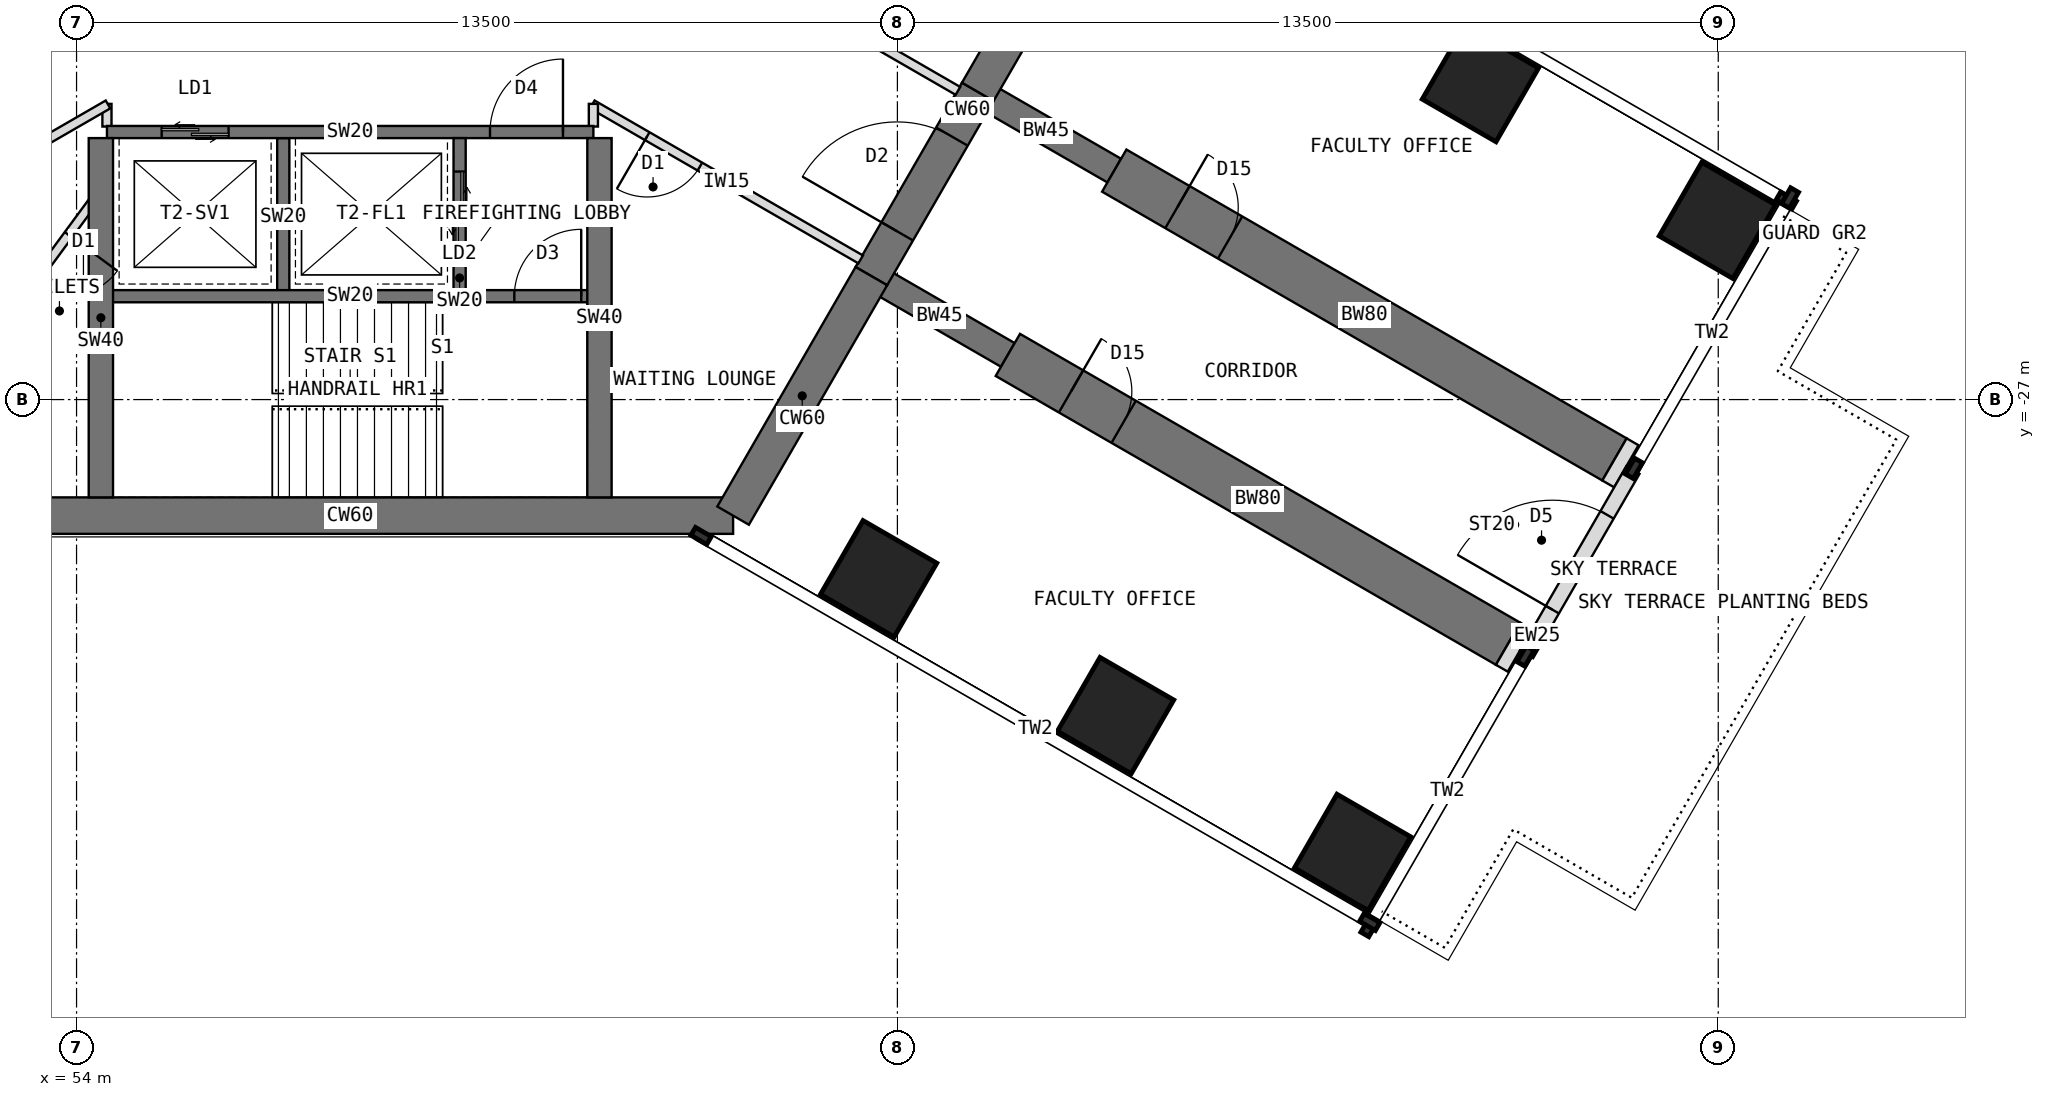
"""IFC4 building model, lengths in metres.
Left out: names, types, materials, properties, quantities, classifications, styles, units other than length and angle.
Written with IfcOpenShell. Run it as: python <this file> out.ifc"""

import sys

from ifc_helpers import new_model, si_unit, direction, frame, frame_2d, origin, origin_2d, place, context, subcontext, project, spatial, rectangle, extrude, element, fill, save


model = new_model("IFC4")
c1 = context("Model", 3, precision=1e-05, world=origin(), true_north=direction((0.0, 1.0)))
c2 = subcontext(c1, "Body", "Model", "MODEL_VIEW")
j1 = project(units=[si_unit("LENGTHUNIT", "METRE"), si_unit("PLANEANGLEUNIT", "RADIAN")], contexts=[c1])
p1 = place(None, origin())
s1 = spatial("IfcSite", under=j1, at=p1, CompositionType="ELEMENT")
p2 = place(p1, origin())
s2 = spatial("IfcBuilding", under=s1, at=p2, CompositionType="ELEMENT")
p3 = place(p2, frame((0.0, 0.0, 97.5)))
s3 = spatial("IfcBuildingStorey", under=s2, at=p3, CompositionType="ELEMENT", Elevation=97.5)
p4 = place(p3, frame((52.202, -28.908, 0.0), z_axis=(0.0, 0.0, 1.0), x_axis=(1.0, 0.0, 0.0)))
e1 = element("IfcWall", 1, at=p4, inside=s3, PredefinedType="SHEAR", context=c2, shape_type="SweptSolid", body=[
    extrude(rectangle(XDim=12.596, YDim=0.6, at=frame_2d((6.298, 0.0))), origin(), (0.0, 0.0, 1.0), 4.0),
])
p5 = place(p3, frame((64.798, -28.908, 0.0), z_axis=(0.0, 0.0, 1.0), x_axis=(0.499984222037, 0.866034513004, 0.0)))
e2 = element("IfcWall", 2, at=p5, inside=s3, PredefinedType="SHEAR", context=c2, shape_type="SweptSolid", body=[
    extrude(rectangle(XDim=4.548, YDim=0.6, at=frame_2d((2.274, 0.0))), origin(), (0.0, 0.0, 1.0), 4.0),
])
p6 = place(p3, frame((67.072, -24.97, 0.0), z_axis=(0.0, 0.0, 1.0), x_axis=(0.500010275428, 0.866019471182, 0.0)))
e3 = element("IfcWall", 3, at=p6, inside=s3, PredefinedType="SHEAR", context=c2, shape_type="SweptSolid", body=[
    extrude(rectangle(XDim=3.5, YDim=0.6, at=frame_2d((1.75, 0.0))), origin(), (0.0, 0.0, 1.0), 4.0),
])
p7 = place(p6, frame((0.85, 0.0, 0.0)))
e4 = element("IfcOpeningElement", 4, at=p7, cuts=e3, PredefinedType="OPENING", context=c2, shape_type="SweptSolid", body=[
    extrude(rectangle(XDim=1.8, YDim=2.1, at=frame_2d((0.9, 1.05))), frame((0.0, 0.31, 0.0), z_axis=(0.0, -1.0, 0.0), x_axis=(1.0, 0.0, 0.0)), (0.0, 0.0, 1.0), 0.62),
])
p8 = place(p3, frame((68.822, -21.939, 0.0), z_axis=(0.0, 0.0, 1.0), x_axis=(0.500024481964, 0.866011268655, 0.0)))
e5 = element("IfcWall", 5, at=p8, inside=s3, PredefinedType="SHEAR", context=c2, shape_type="SweptSolid", body=[
    extrude(rectangle(XDim=4.548, YDim=0.6, at=frame_2d((2.274, 0.0))), origin(), (0.0, 0.0, 1.0), 4.0),
])
p9 = place(p3, frame((68.822, -21.939, 0.0), z_axis=(0.0, 0.0, 1.0), x_axis=(0.866072649678, -0.499918158782, 0.0)))
e6 = element("IfcWall", 6, at=p9, inside=s3, PredefinedType="SHEAR", context=c2, shape_type="SweptSolid", body=[
    extrude(rectangle(XDim=2.592, YDim=0.45, at=frame_2d((1.296, 0.0))), origin(), (0.0, 0.0, 1.0), 4.0),
])
p10 = place(p3, frame((71.066, -23.234, 0.0), z_axis=(0.0, 0.0, 1.0), x_axis=(0.86602681393, -0.499997557548, 0.0)))
e7 = element("IfcWall", 7, at=p10, inside=s3, PredefinedType="SHEAR", context=c2, shape_type="SweptSolid", body=[
    extrude(rectangle(XDim=9.5, YDim=0.8, at=frame_2d((4.75, 0.0))), origin(), (0.0, 0.0, 1.0), 4.0),
])
p11 = place(p10, frame((1.2, 0.0, 0.0)))
e8 = element("IfcOpeningElement", 8, at=p11, cuts=e7, PredefinedType="OPENING", context=c2, shape_type="SweptSolid", body=[
    extrude(rectangle(XDim=1.0, YDim=2.1, at=frame_2d((0.5, 1.05))), frame((0.0, 0.41, 0.0), z_axis=(0.0, -1.0, 0.0), x_axis=(1.0, 0.0, 0.0)), (0.0, 0.0, 1.0), 0.82),
])
p12 = place(p3, frame((67.072, -24.97, 0.0), z_axis=(0.0, 0.0, 1.0), x_axis=(0.866031863473, -0.499988811324, 0.0)))
e9 = element("IfcWall", 9, at=p12, inside=s3, PredefinedType="SHEAR", context=c2, shape_type="SweptSolid", body=[
    extrude(rectangle(XDim=2.592, YDim=0.45, at=frame_2d((1.296, 0.0))), origin(), (0.0, 0.0, 1.0), 4.0),
])
p13 = place(p3, frame((69.316, -26.266, 0.0), z_axis=(0.0, 0.0, 1.0), x_axis=(0.86602681393, -0.499997557548, 0.0)))
e10 = element("IfcWall", 10, at=p13, inside=s3, PredefinedType="SHEAR", context=c2, shape_type="SweptSolid", body=[
    extrude(rectangle(XDim=9.5, YDim=0.8, at=frame_2d((4.75, 0.0))), origin(), (0.0, 0.0, 1.0), 4.0),
])
p14 = place(p13, frame((1.2, 0.0, 0.0)))
e11 = element("IfcOpeningElement", 11, at=p14, cuts=e10, PredefinedType="OPENING", context=c2, shape_type="SweptSolid", body=[
    extrude(rectangle(XDim=1.0, YDim=2.1, at=frame_2d((0.5, 1.05))), frame((0.0, 0.41, 0.0), z_axis=(0.0, -1.0, 0.0), x_axis=(1.0, 0.0, 0.0)), (0.0, 0.0, 1.0), 0.82),
])
for number, where, z_axis, x_axis in (
    (12, (67.191, -29.946, 0.0), (0.0, 0.0, 1.0), (0.5, 0.866, 0.0)),
    (13, (77.088, -21.804, 0.0), (0.0, 0.0, 1.0), (0.5, 0.866, 0.0)),
    (14, (71.088, -32.196, 0.0), (0.0, 0.0, 1.0), (0.5, 0.866, 0.0)),
    (15, (80.986, -24.054, 0.0), (0.0, 0.0, 1.0), (0.5, 0.866, 0.0)),
    (16, (74.986, -34.446, 0.0), (0.0, 0.0, 1.0), (0.5, 0.866, 0.0)),
):
    element("IfcColumn", number, at=place(p3, frame(where, z_axis=z_axis, x_axis=x_axis)), inside=s3, PredefinedType="COLUMN", context=c2, shape_type="SweptSolid", body=[
        extrude(rectangle(XDim=1.4, YDim=1.4, at=origin_2d()), origin(), (0.0, 0.0, 1.0), 4.0),
    ])
p15 = place(p3, frame((77.847, -31.19, 0.0), z_axis=(0.0, 0.0, 1.0), x_axis=(0.500010275428, 0.866019471182, 0.0)))
e17 = element("IfcWall", 17, at=p15, inside=s3, PredefinedType="STANDARD", context=c2, shape_type="SweptSolid", body=[
    extrude(rectangle(XDim=3.5, YDim=0.25, at=frame_2d((1.75, 0.0))), origin(), (0.0, 0.0, 1.0), 3.8),
])
p16 = place(p15, frame((0.85, 0.0, 0.0)))
e18 = element("IfcOpeningElement", 18, at=p16, cuts=e17, PredefinedType="OPENING", context=c2, shape_type="SweptSolid", body=[
    extrude(rectangle(XDim=1.8, YDim=2.4, at=frame_2d((0.9, 1.2))), frame((0.0, 0.135, 0.0), z_axis=(0.0, -1.0, 0.0), x_axis=(1.0, 0.0, 0.0)), (0.0, 0.0, 1.0), 0.27),
])
p17 = place(p3, frame((79.294, -27.984, 0.0), z_axis=(0.0, 0.0, 1.0), x_axis=(0.865896406789, -0.500223362819, 0.0)))
e19 = element("IfcWall", 19, at=p17, inside=s3, PredefinedType="PARTITIONING", context=c2, shape_type="SweptSolid", body=[
    extrude(rectangle(XDim=0.225, YDim=0.8, at=frame_2d((0.113, 0.0))), origin(), (0.0, 0.0, 1.0), 3.8),
])
p18 = place(p3, frame((77.544, -31.016, 0.0), z_axis=(0.0, 0.0, 1.0), x_axis=(0.866366273901, -0.499409130319, 0.0)))
e20 = element("IfcWall", 20, at=p18, inside=s3, PredefinedType="PARTITIONING", context=c2, shape_type="SweptSolid", body=[
    extrude(rectangle(XDim=0.225, YDim=0.8, at=frame_2d((0.112, 0.0))), origin(), (0.0, 0.0, 1.0), 3.8),
])
p19 = place(p3, frame((54.5, -22.6, 0.0), z_axis=(0.0, 0.0, 1.0), x_axis=(1.0, 0.0, 0.0)))
e21 = element("IfcWall", 21, at=p19, inside=s3, PredefinedType="SHEAR", context=c2, shape_type="SweptSolid", body=[
    extrude(rectangle(XDim=8.0, YDim=0.2, at=frame_2d((4.0, 0.0))), origin(), (0.0, 0.0, 1.0), 4.0),
])
p20 = place(p19, frame((6.3, 0.0, 0.0)))
e22 = element("IfcOpeningElement", 22, at=p20, cuts=e21, PredefinedType="OPENING", context=c2, shape_type="SweptSolid", body=[
    extrude(rectangle(XDim=1.2, YDim=2.1, at=frame_2d((0.6, 1.05))), frame((0.0, 0.11, 0.0), z_axis=(0.0, -1.0, 0.0), x_axis=(1.0, 0.0, 0.0)), (0.0, 0.0, 1.0), 0.22),
])
p21 = place(p19, frame((0.9, 0.0, 0.0)))
e23 = element("IfcOpeningElement", 23, at=p21, cuts=e21, PredefinedType="OPENING", context=c2, shape_type="SweptSolid", body=[
    extrude(rectangle(XDim=1.1, YDim=2.2, at=frame_2d((0.55, 1.1))), frame((0.0, 0.11, 0.0), z_axis=(0.0, -1.0, 0.0), x_axis=(1.0, 0.0, 0.0)), (0.0, 0.0, 1.0), 0.22),
])
p22 = place(p3, frame((57.4, -22.7, 0.0), z_axis=(0.0, 0.0, 1.0), x_axis=(0.0, -1.0, 0.0)))
e24 = element("IfcWall", 24, at=p22, inside=s3, PredefinedType="SHEAR", context=c2, shape_type="SweptSolid", body=[
    extrude(rectangle(XDim=2.6, YDim=0.2, at=frame_2d((1.3, 0.0))), origin(), (0.0, 0.0, 1.0), 4.0),
])
p23 = place(p3, frame((60.3, -22.7, 0.0), z_axis=(0.0, 0.0, 1.0), x_axis=(0.0, -1.0, 0.0)))
e25 = element("IfcWall", 25, at=p23, inside=s3, PredefinedType="SHEAR", context=c2, shape_type="SweptSolid", body=[
    extrude(rectangle(XDim=2.6, YDim=0.2, at=frame_2d((1.3, 0.0))), origin(), (0.0, 0.0, 1.0), 4.0),
])
p24 = place(p23, frame((0.55, 0.0, 0.0)))
e26 = element("IfcOpeningElement", 26, at=p24, cuts=e25, PredefinedType="OPENING", context=c2, shape_type="SweptSolid", body=[
    extrude(rectangle(XDim=1.3, YDim=2.2, at=frame_2d((0.65, 1.1))), frame((0.0, 0.11, 0.0), z_axis=(0.0, -1.0, 0.0), x_axis=(1.0, 0.0, 0.0)), (0.0, 0.0, 1.0), 0.22),
])
p25 = place(p3, frame((54.5, -25.3, 0.0), z_axis=(0.0, 0.0, 1.0), x_axis=(1.0, 0.0, 0.0)))
e27 = element("IfcWall", 27, at=p25, inside=s3, PredefinedType="SHEAR", context=c2, shape_type="SweptSolid", body=[
    extrude(rectangle(XDim=8.0, YDim=0.2, at=frame_2d((4.0, 0.0))), origin(), (0.0, 0.0, 1.0), 4.0),
])
p26 = place(p25, frame((6.7, 0.0, 0.0)))
e28 = element("IfcOpeningElement", 28, at=p26, cuts=e27, PredefinedType="OPENING", context=c2, shape_type="SweptSolid", body=[
    extrude(rectangle(XDim=1.1, YDim=2.1, at=frame_2d((0.55, 1.05))), frame((0.0, 0.11, 0.0), z_axis=(0.0, -1.0, 0.0), x_axis=(1.0, 0.0, 0.0)), (0.0, 0.0, 1.0), 0.22),
])
for number, where, z_axis, x_axis in (
    (29, (62.6, -22.7, 0.0), (0.0, 0.0, 1.0), (0.0, -1.0, 0.0)),
    (30, (54.4, -22.7, 0.0), (0.0, 0.0, 1.0), (0.0, -1.0, 0.0)),
):
    element("IfcWall", number, at=place(p3, frame(where, z_axis=z_axis, x_axis=x_axis)), inside=s3, PredefinedType="SHEAR", context=c2, shape_type="SweptSolid", body=[
        extrude(rectangle(XDim=5.908, YDim=0.4, at=frame_2d((2.954, 0.0))), origin(), (0.0, 0.0, 1.0), 4.0),
    ])
p27 = place(p3, frame((54.5, -22.51, 0.0), z_axis=(0.0, 0.0, 1.0), x_axis=(0.0, 1.0, 0.0)))
e31 = element("IfcWall", 31, at=p27, inside=s3, PredefinedType="PARTITIONING", context=c2, shape_type="SweptSolid", body=[
    extrude(rectangle(XDim=0.373, YDim=0.15, at=frame_2d((0.187, 0.0))), origin(), (0.0, 0.0, 1.0), 3.8),
])
p28 = place(p3, frame((54.517, -22.147, 0.0), z_axis=(0.0, 0.0, 1.0), x_axis=(-0.866029209911, -0.499993407537, 0.0)))
e32 = element("IfcWall", 32, at=p28, inside=s3, PredefinedType="PARTITIONING", context=c2, shape_type="SweptSolid", body=[
    extrude(rectangle(XDim=5.096, YDim=0.15, at=frame_2d((2.548, 0.0))), origin(), (0.0, 0.0, 1.0), 3.8),
])
p29 = place(p28, frame((3.073, 0.0, 0.0)))
e33 = element("IfcOpeningElement", 33, at=p29, cuts=e32, PredefinedType="OPENING", context=c2, shape_type="SweptSolid", body=[
    extrude(rectangle(XDim=1.0, YDim=2.1, at=frame_2d((0.5, 1.05))), frame((0.0, 0.085, 0.0), z_axis=(0.0, -1.0, 0.0), x_axis=(1.0, 0.0, 0.0)), (0.0, 0.0, 1.0), 0.17),
])
p30 = place(p3, frame((64.083, -19.375, 0.0), z_axis=(0.0, 0.0, 1.0), x_axis=(0.865996484538, -0.500050086259, 0.0)))
e34 = element("IfcWall", 34, at=p30, inside=s3, PredefinedType="PARTITIONING", context=c2, shape_type="SweptSolid", body=[
    extrude(rectangle(XDim=5.096, YDim=0.15, at=frame_2d((2.548, 0.0))), origin(), (0.0, 0.0, 1.0), 3.8),
])
p31 = place(p30, frame((1.043, 0.0, 0.0)))
e35 = element("IfcOpeningElement", 35, at=p31, cuts=e34, PredefinedType="OPENING", context=c2, shape_type="SweptSolid", body=[
    extrude(rectangle(XDim=1.0, YDim=2.1, at=frame_2d((0.5, 1.05))), frame((0.0, 0.085, 0.0), z_axis=(0.0, -1.0, 0.0), x_axis=(1.0, 0.0, 0.0)), (0.0, 0.0, 1.0), 0.17),
])
p32 = place(p3, frame((66.896, -24.695, 0.0), z_axis=(0.0, 0.0, 1.0), x_axis=(-0.866029209911, 0.499993407537, 0.0)))
e36 = element("IfcWall", 36, at=p32, inside=s3, PredefinedType="PARTITIONING", context=c2, shape_type="SweptSolid", body=[
    extrude(rectangle(XDim=5.096, YDim=0.15, at=frame_2d((2.548, 0.0))), origin(), (0.0, 0.0, 1.0), 3.8),
])
p33 = place(p32, frame((3.053, 0.0, 0.0)))
e37 = element("IfcOpeningElement", 37, at=p33, cuts=e36, PredefinedType="OPENING", context=c2, shape_type="SweptSolid", body=[
    extrude(rectangle(XDim=1.0, YDim=2.1, at=frame_2d((0.5, 1.05))), frame((0.0, 0.085, 0.0), z_axis=(0.0, -1.0, 0.0), x_axis=(1.0, 0.0, 0.0)), (0.0, 0.0, 1.0), 0.17),
])
p34 = place(p3, frame((62.5, -22.137, 0.0), z_axis=(0.0, 0.0, 1.0), x_axis=(0.0, -1.0, 0.0)))
e38 = element("IfcWall", 38, at=p34, inside=s3, PredefinedType="PARTITIONING", context=c2, shape_type="SweptSolid", body=[
    extrude(rectangle(XDim=0.373, YDim=0.15, at=frame_2d((0.187, 0.0))), origin(), (0.0, 0.0, 1.0), 3.8),
])
p35 = place(p3, frame((54.4, -23.566, 0.0), z_axis=(0.0, 0.0, 1.0), x_axis=(-0.59307051543, -0.805150522404, 0.0)))
e39 = element("IfcWall", 39, at=p35, inside=s3, PredefinedType="PARTITIONING", context=c2, shape_type="SweptSolid", body=[
    extrude(rectangle(XDim=4.666, YDim=0.15, at=frame_2d((2.333, 0.0))), origin(), (0.0, 0.0, 1.0), 3.8),
])
p36 = place(p35, frame((0.9, 0.0, 0.0)))
e40 = element("IfcOpeningElement", 40, at=p36, cuts=e39, PredefinedType="OPENING", context=c2, shape_type="SweptSolid", body=[
    extrude(rectangle(XDim=1.0, YDim=2.1, at=frame_2d((0.5, 1.05))), frame((0.0, 0.085, 0.0), z_axis=(0.0, -1.0, 0.0), x_axis=(1.0, 0.0, 0.0)), (0.0, 0.0, 1.0), 0.17),
])
p37 = place(p16, origin())
e41 = element("IfcDoor", 41, at=p37, inside=s3, OperationType="DOUBLE_DOOR_DOUBLE_SWING", PredefinedType="DOOR", context=c2, shape_type="SweptSolid", body=[
    extrude(rectangle(XDim=1.8, YDim=2.4, at=frame_2d((0.9, 1.2))), frame((0.0, 0.025, 0.0), z_axis=(0.0, -1.0, 0.0), x_axis=(1.0, 0.0, 0.0)), (0.0, 0.0, 1.0), 0.05),
])
fill(e18, e41)
p38 = place(p20, origin())
e42 = element("IfcDoor", 42, at=p38, inside=s3, OperationType="SINGLE_SWING_RIGHT", PredefinedType="DOOR", context=c2, shape_type="SweptSolid", body=[
    extrude(rectangle(XDim=1.2, YDim=2.1, at=frame_2d((0.6, 1.05))), frame((0.0, 0.025, 0.0), z_axis=(0.0, -1.0, 0.0), x_axis=(1.0, 0.0, 0.0)), (0.0, 0.0, 1.0), 0.05),
])
fill(e22, e42)
p39 = place(p24, origin())
e43 = element("IfcDoor", 43, at=p39, inside=s3, OperationType="DOUBLE_DOOR_SLIDING", PredefinedType="DOOR", context=c2, shape_type="SweptSolid", body=[
    extrude(rectangle(XDim=1.3, YDim=2.2, at=frame_2d((0.65, 1.1))), frame((0.0, 0.025, 0.0), z_axis=(0.0, -1.0, 0.0), x_axis=(1.0, 0.0, 0.0)), (0.0, 0.0, 1.0), 0.05),
])
fill(e26, e43)
p40 = place(p21, origin())
e44 = element("IfcDoor", 44, at=p40, inside=s3, OperationType="DOUBLE_DOOR_SLIDING", PredefinedType="DOOR", context=c2, shape_type="SweptSolid", body=[
    extrude(rectangle(XDim=1.1, YDim=2.2, at=frame_2d((0.55, 1.1))), frame((0.0, 0.025, 0.0), z_axis=(0.0, -1.0, 0.0), x_axis=(1.0, 0.0, 0.0)), (0.0, 0.0, 1.0), 0.05),
])
fill(e23, e44)
p41 = place(p26, origin())
e45 = element("IfcDoor", 45, at=p41, inside=s3, OperationType="SINGLE_SWING_RIGHT", PredefinedType="DOOR", context=c2, shape_type="SweptSolid", body=[
    extrude(rectangle(XDim=1.1, YDim=2.1, at=frame_2d((0.55, 1.05))), frame((0.0, 0.025, 0.0), z_axis=(0.0, -1.0, 0.0), x_axis=(1.0, 0.0, 0.0)), (0.0, 0.0, 1.0), 0.05),
])
fill(e28, e45)
p42 = place(p7, origin())
e46 = element("IfcDoor", 46, at=p42, inside=s3, OperationType="DOUBLE_DOOR_DOUBLE_SWING", PredefinedType="DOOR", context=c2, shape_type="SweptSolid", body=[
    extrude(rectangle(XDim=1.72, YDim=2.06, at=frame_2d((0.9, 1.03))), frame((0.0, 0.025, 0.0), z_axis=(0.0, -1.0, 0.0), x_axis=(1.0, 0.0, 0.0)), (0.0, 0.0, 1.0), 0.05),
    extrude(rectangle(XDim=0.04, YDim=2.1, at=frame_2d((0.02, 1.05))), frame((0.0, 0.3, 0.0), z_axis=(0.0, -1.0, 0.0), x_axis=(1.0, 0.0, 0.0)), (0.0, 0.0, 1.0), 0.6),
    extrude(rectangle(XDim=0.04, YDim=2.1, at=frame_2d((1.78, 1.05))), frame((0.0, 0.3, 0.0), z_axis=(0.0, -1.0, 0.0), x_axis=(1.0, 0.0, 0.0)), (0.0, 0.0, 1.0), 0.6),
    extrude(rectangle(XDim=1.72, YDim=0.04, at=frame_2d((0.9, 2.08))), frame((0.0, 0.3, 0.0), z_axis=(0.0, -1.0, 0.0), x_axis=(1.0, 0.0, 0.0)), (0.0, 0.0, 1.0), 0.6),
])
fill(e4, e46)
p43 = place(p36, origin())
e47 = element("IfcDoor", 47, at=p43, inside=s3, OperationType="SINGLE_SWING_LEFT", PredefinedType="DOOR", context=c2, shape_type="SweptSolid", body=[
    extrude(rectangle(XDim=1.0, YDim=2.1, at=frame_2d((0.5, 1.05))), frame((0.0, 0.025, 0.0), z_axis=(0.0, -1.0, 0.0), x_axis=(1.0, 0.0, 0.0)), (0.0, 0.0, 1.0), 0.05),
])
fill(e40, e47)
p44 = place(p33, origin())
e48 = element("IfcDoor", 48, at=p44, inside=s3, OperationType="SINGLE_SWING_RIGHT", PredefinedType="DOOR", context=c2, shape_type="SweptSolid", body=[
    extrude(rectangle(XDim=1.0, YDim=2.1, at=frame_2d((0.5, 1.05))), frame((0.0, 0.025, 0.0), z_axis=(0.0, -1.0, 0.0), x_axis=(1.0, 0.0, 0.0)), (0.0, 0.0, 1.0), 0.05),
])
fill(e37, e48)
p45 = place(p11, origin())
e49 = element("IfcDoor", 49, at=p45, inside=s3, OperationType="SINGLE_SWING_LEFT", PredefinedType="DOOR", context=c2, shape_type="SweptSolid", body=[
    extrude(rectangle(XDim=0.92, YDim=2.06, at=frame_2d((0.5, 1.03))), frame((0.0, 0.025, 0.0), z_axis=(0.0, -1.0, 0.0), x_axis=(1.0, 0.0, 0.0)), (0.0, 0.0, 1.0), 0.05),
    extrude(rectangle(XDim=0.04, YDim=2.1, at=frame_2d((0.02, 1.05))), frame((0.0, 0.4, 0.0), z_axis=(0.0, -1.0, 0.0), x_axis=(1.0, 0.0, 0.0)), (0.0, 0.0, 1.0), 0.8),
    extrude(rectangle(XDim=0.04, YDim=2.1, at=frame_2d((0.98, 1.05))), frame((0.0, 0.4, 0.0), z_axis=(0.0, -1.0, 0.0), x_axis=(1.0, 0.0, 0.0)), (0.0, 0.0, 1.0), 0.8),
    extrude(rectangle(XDim=0.92, YDim=0.04, at=frame_2d((0.5, 2.08))), frame((0.0, 0.4, 0.0), z_axis=(0.0, -1.0, 0.0), x_axis=(1.0, 0.0, 0.0)), (0.0, 0.0, 1.0), 0.8),
])
fill(e8, e49)
p46 = place(p14, origin())
e50 = element("IfcDoor", 50, at=p46, inside=s3, OperationType="SINGLE_SWING_LEFT", PredefinedType="DOOR", context=c2, shape_type="SweptSolid", body=[
    extrude(rectangle(XDim=0.92, YDim=2.06, at=frame_2d((0.5, 1.03))), frame((0.0, 0.025, 0.0), z_axis=(0.0, -1.0, 0.0), x_axis=(1.0, 0.0, 0.0)), (0.0, 0.0, 1.0), 0.05),
    extrude(rectangle(XDim=0.04, YDim=2.1, at=frame_2d((0.02, 1.05))), frame((0.0, 0.4, 0.0), z_axis=(0.0, -1.0, 0.0), x_axis=(1.0, 0.0, 0.0)), (0.0, 0.0, 1.0), 0.8),
    extrude(rectangle(XDim=0.04, YDim=2.1, at=frame_2d((0.98, 1.05))), frame((0.0, 0.4, 0.0), z_axis=(0.0, -1.0, 0.0), x_axis=(1.0, 0.0, 0.0)), (0.0, 0.0, 1.0), 0.8),
    extrude(rectangle(XDim=0.92, YDim=0.04, at=frame_2d((0.5, 2.08))), frame((0.0, 0.4, 0.0), z_axis=(0.0, -1.0, 0.0), x_axis=(1.0, 0.0, 0.0)), (0.0, 0.0, 1.0), 0.8),
])
fill(e11, e50)
save(model, sys.argv[1])
